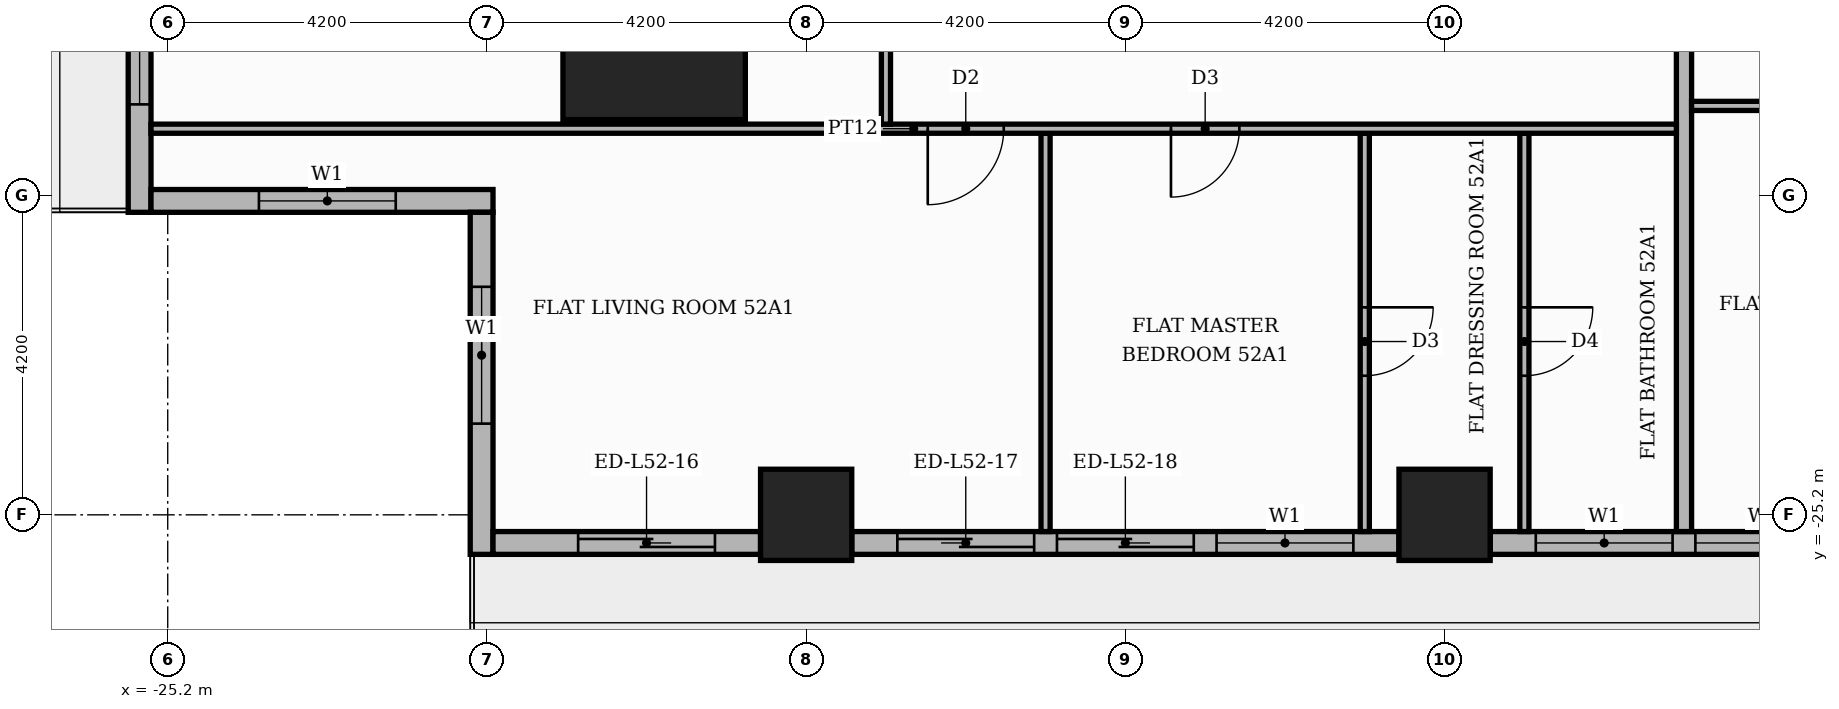
"""IFC4 building model, lengths in metres.
Left out: names, types, materials, properties, quantities, classifications, styles, units other than length and angle.
Written with IfcOpenShell. Run it as: python <this file> out.ifc"""

import sys

from ifc_helpers import new_model, si_unit, direction, frame, frame_2d, origin, origin_2d, place, context, subcontext, project, spatial, rectangle, extrude, element, fill, save


model = new_model("IFC4")
c1 = context("Model", 3, precision=1e-05, world=origin(), true_north=direction((0.0, 1.0)))
c2 = subcontext(c1, "Body", "Model", "MODEL_VIEW")
j1 = project(units=[si_unit("LENGTHUNIT", "METRE"), si_unit("PLANEANGLEUNIT", "RADIAN")], contexts=[c1])
p1 = place(None, origin())
s1 = spatial("IfcSite", under=j1, at=p1, CompositionType="ELEMENT")
p2 = place(p1, origin())
s2 = spatial("IfcBuilding", under=s1, at=p2, CompositionType="ELEMENT")
p3 = place(p2, frame((0.0, 0.0, 219.6)))
s3 = spatial("IfcBuildingStorey", under=s2, at=p3, CompositionType="ELEMENT", Elevation=219.6)
p4 = place(p3, frame((-18.8, -18.8, 0.0), z_axis=(0.0, 0.0, 1.0), x_axis=(1.0, 0.0, 0.0)))
e1 = element("IfcColumn", 1, at=p4, inside=s3, PredefinedType="COLUMN", context=c2, shape_type="SweptSolid", body=[
    extrude(rectangle(XDim=2.4, YDim=2.4, at=origin_2d()), origin(), (0.0, 0.0, 1.0), 3.9),
])
for number, where, z_axis, x_axis in (
    (2, (-8.4, -25.2, 0.0), (0.0, 0.0, 1.0), (1.0, 0.0, 0.0)),
    (3, (-16.8, -25.2, 0.0), (0.0, 0.0, 1.0), (1.0, 0.0, 0.0)),
):
    element("IfcColumn", number, at=place(p3, frame(where, z_axis=z_axis, x_axis=x_axis)), inside=s3, PredefinedType="COLUMN", context=c2, shape_type="SweptSolid", body=[
        extrude(rectangle(XDim=1.2, YDim=1.2, at=origin_2d()), origin(), (0.0, 0.0, 1.0), 3.9),
    ])
p5 = place(p3, frame((-25.57, -17.4, 0.0), z_axis=(0.0, 0.0, 1.0), x_axis=(0.0, -1.0, 0.0)))
e4 = element("IfcWall", 4, at=p5, inside=s3, PredefinedType="STANDARD", context=c2, shape_type="SweptSolid", body=[
    extrude(rectangle(XDim=3.82, YDim=0.3, at=frame_2d((1.91, 0.0))), origin(), (0.0, 0.0, 1.0), 3.48),
])
p6 = place(p5, frame((0.6, 0.0, 0.9)))
e5 = element("IfcOpeningElement", 5, at=p6, cuts=e4, PredefinedType="OPENING", context=c2, shape_type="SweptSolid", body=[
    extrude(rectangle(XDim=1.8, YDim=2.1, at=frame_2d((0.9, 1.05))), frame((0.0, 0.16, 0.0), z_axis=(0.0, -1.0, 0.0), x_axis=(1.0, 0.0, 0.0)), (0.0, 0.0, 1.0), 0.32),
])
p7 = place(p3, frame((-25.42, -21.07, 0.0), z_axis=(0.0, 0.0, 1.0), x_axis=(1.0, 0.0, 0.0)))
e6 = element("IfcWall", 6, at=p7, inside=s3, PredefinedType="STANDARD", context=c2, shape_type="SweptSolid", body=[
    extrude(rectangle(XDim=4.5, YDim=0.3, at=frame_2d((2.25, 0.0))), origin(), (0.0, 0.0, 1.0), 3.48),
])
p8 = place(p7, frame((1.42, 0.0, 0.9)))
e7 = element("IfcOpeningElement", 7, at=p8, cuts=e6, PredefinedType="OPENING", context=c2, shape_type="SweptSolid", body=[
    extrude(rectangle(XDim=1.8, YDim=2.1, at=frame_2d((0.9, 1.05))), frame((0.0, 0.16, 0.0), z_axis=(0.0, -1.0, 0.0), x_axis=(1.0, 0.0, 0.0)), (0.0, 0.0, 1.0), 0.32),
])
p9 = place(p3, frame((-21.07, -21.22, 0.0), z_axis=(0.0, 0.0, 1.0), x_axis=(0.0, -1.0, 0.0)))
e8 = element("IfcWall", 8, at=p9, inside=s3, PredefinedType="STANDARD", context=c2, shape_type="SweptSolid", body=[
    extrude(rectangle(XDim=4.5, YDim=0.3, at=frame_2d((2.25, 0.0))), origin(), (0.0, 0.0, 1.0), 3.48),
])
p10 = place(p9, frame((0.98, 0.0, 0.9)))
e9 = element("IfcOpeningElement", 9, at=p10, cuts=e8, PredefinedType="OPENING", context=c2, shape_type="SweptSolid", body=[
    extrude(rectangle(XDim=1.8, YDim=2.1, at=frame_2d((0.9, 1.05))), frame((0.0, 0.16, 0.0), z_axis=(0.0, -1.0, 0.0), x_axis=(1.0, 0.0, 0.0)), (0.0, 0.0, 1.0), 0.32),
])
p11 = place(p3, frame((-20.92, -25.57, 0.0), z_axis=(0.0, 0.0, 1.0), x_axis=(1.0, 0.0, 0.0)))
e10 = element("IfcWall", 10, at=p11, inside=s3, PredefinedType="STANDARD", context=c2, shape_type="SweptSolid", body=[
    extrude(rectangle(XDim=3.52, YDim=0.3, at=frame_2d((1.76, 0.0))), origin(), (0.0, 0.0, 1.0), 3.48),
])
p12 = place(p11, frame((1.12, 0.0, 0.0)))
e11 = element("IfcOpeningElement", 11, at=p12, cuts=e10, PredefinedType="OPENING", context=c2, shape_type="SweptSolid", body=[
    extrude(rectangle(XDim=1.8, YDim=2.4, at=frame_2d((0.9, 1.2))), frame((0.0, 0.16, 0.0), z_axis=(0.0, -1.0, 0.0), x_axis=(1.0, 0.0, 0.0)), (0.0, 0.0, 1.0), 0.32),
])
p13 = place(p3, frame((-16.2, -25.57, 0.0), z_axis=(0.0, 0.0, 1.0), x_axis=(1.0, 0.0, 0.0)))
e12 = element("IfcWall", 12, at=p13, inside=s3, PredefinedType="STANDARD", context=c2, shape_type="SweptSolid", body=[
    extrude(rectangle(XDim=7.2, YDim=0.3, at=frame_2d((3.6, 0.0))), origin(), (0.0, 0.0, 1.0), 3.48),
])
p14 = place(p13, frame((0.6, 0.0, 0.0)))
e13 = element("IfcOpeningElement", 13, at=p14, cuts=e12, PredefinedType="OPENING", context=c2, shape_type="SweptSolid", body=[
    extrude(rectangle(XDim=1.8, YDim=2.4, at=frame_2d((0.9, 1.2))), frame((0.0, 0.16, 0.0), z_axis=(0.0, -1.0, 0.0), x_axis=(1.0, 0.0, 0.0)), (0.0, 0.0, 1.0), 0.32),
])
p15 = place(p13, frame((2.7, 0.0, 0.0)))
e14 = element("IfcOpeningElement", 14, at=p15, cuts=e12, PredefinedType="OPENING", context=c2, shape_type="SweptSolid", body=[
    extrude(rectangle(XDim=1.8, YDim=2.4, at=frame_2d((0.9, 1.2))), frame((0.0, 0.16, 0.0), z_axis=(0.0, -1.0, 0.0), x_axis=(1.0, 0.0, 0.0)), (0.0, 0.0, 1.0), 0.32),
])
p16 = place(p13, frame((4.8, 0.0, 0.9)))
e15 = element("IfcOpeningElement", 15, at=p16, cuts=e12, PredefinedType="OPENING", context=c2, shape_type="SweptSolid", body=[
    extrude(rectangle(XDim=1.8, YDim=2.1, at=frame_2d((0.9, 1.05))), frame((0.0, 0.16, 0.0), z_axis=(0.0, -1.0, 0.0), x_axis=(1.0, 0.0, 0.0)), (0.0, 0.0, 1.0), 0.32),
])
p17 = place(p3, frame((-7.8, -25.57, 0.0), z_axis=(0.0, 0.0, 1.0), x_axis=(1.0, 0.0, 0.0)))
e16 = element("IfcWall", 16, at=p17, inside=s3, PredefinedType="STANDARD", context=c2, shape_type="SweptSolid", body=[
    extrude(rectangle(XDim=7.2, YDim=0.3, at=frame_2d((3.6, 0.0))), origin(), (0.0, 0.0, 1.0), 3.48),
])
p18 = place(p17, frame((0.6, 0.0, 0.9)))
e17 = element("IfcOpeningElement", 17, at=p18, cuts=e16, PredefinedType="OPENING", context=c2, shape_type="SweptSolid", body=[
    extrude(rectangle(XDim=1.8, YDim=2.1, at=frame_2d((0.9, 1.05))), frame((0.0, 0.16, 0.0), z_axis=(0.0, -1.0, 0.0), x_axis=(1.0, 0.0, 0.0)), (0.0, 0.0, 1.0), 0.32),
])
p19 = place(p17, frame((2.7, 0.0, 0.9)))
e18 = element("IfcOpeningElement", 18, at=p19, cuts=e16, PredefinedType="OPENING", context=c2, shape_type="SweptSolid", body=[
    extrude(rectangle(XDim=1.8, YDim=2.1, at=frame_2d((0.9, 1.05))), frame((0.0, 0.16, 0.0), z_axis=(0.0, -1.0, 0.0), x_axis=(1.0, 0.0, 0.0)), (0.0, 0.0, 1.0), 0.32),
])
p20 = place(p17, frame((4.8, 0.0, 0.0)))
e19 = element("IfcOpeningElement", 19, at=p20, cuts=e16, PredefinedType="OPENING", context=c2, shape_type="SweptSolid", body=[
    extrude(rectangle(XDim=1.8, YDim=2.4, at=frame_2d((0.9, 1.2))), frame((0.0, 0.16, 0.0), z_axis=(0.0, -1.0, 0.0), x_axis=(1.0, 0.0, 0.0)), (0.0, 0.0, 1.0), 0.32),
])
p21 = place(p3, frame((-13.65, -25.42, 0.0), z_axis=(0.0, 0.0, 1.0), x_axis=(0.0, 1.0, 0.0)))
e20 = element("IfcWall", 20, at=p21, inside=s3, PredefinedType="PARTITIONING", context=c2, shape_type="SweptSolid", body=[
    extrude(rectangle(XDim=5.24, YDim=0.12, at=frame_2d((2.62, 0.0))), origin(), (0.0, 0.0, 1.0), 3.48),
])
p22 = place(p3, frame((-9.45, -25.42, 0.0), z_axis=(0.0, 0.0, 1.0), x_axis=(0.0, 1.0, 0.0)))
e21 = element("IfcWall", 21, at=p22, inside=s3, PredefinedType="PARTITIONING", context=c2, shape_type="SweptSolid", body=[
    extrude(rectangle(XDim=5.24, YDim=0.12, at=frame_2d((2.62, 0.0))), origin(), (0.0, 0.0, 1.0), 3.48),
])
p23 = place(p22, frame((2.05, 0.0, 0.0)))
e22 = element("IfcOpeningElement", 22, at=p23, cuts=e21, PredefinedType="OPENING", context=c2, shape_type="SweptSolid", body=[
    extrude(rectangle(XDim=0.9, YDim=2.1, at=frame_2d((0.45, 1.05))), frame((0.0, 0.07, 0.0), z_axis=(0.0, -1.0, 0.0), x_axis=(1.0, 0.0, 0.0)), (0.0, 0.0, 1.0), 0.14),
])
p24 = place(p3, frame((-7.35, -25.42, 0.0), z_axis=(0.0, 0.0, 1.0), x_axis=(0.0, 1.0, 0.0)))
e23 = element("IfcWall", 23, at=p24, inside=s3, PredefinedType="PARTITIONING", context=c2, shape_type="SweptSolid", body=[
    extrude(rectangle(XDim=5.24, YDim=0.12, at=frame_2d((2.62, 0.0))), origin(), (0.0, 0.0, 1.0), 3.48),
])
p25 = place(p24, frame((2.05, 0.0, 0.0)))
e24 = element("IfcOpeningElement", 24, at=p25, cuts=e23, PredefinedType="OPENING", context=c2, shape_type="SweptSolid", body=[
    extrude(rectangle(XDim=0.9, YDim=2.1, at=frame_2d((0.45, 1.05))), frame((0.0, 0.07, 0.0), z_axis=(0.0, -1.0, 0.0), x_axis=(1.0, 0.0, 0.0)), (0.0, 0.0, 1.0), 0.14),
])
p26 = place(p3, frame((-5.25, -25.42, 0.0), z_axis=(0.0, 0.0, 1.0), x_axis=(0.0, 1.0, 0.0)))
e25 = element("IfcWall", 25, at=p26, inside=s3, PredefinedType="PARTITIONING", context=c2, shape_type="SweptSolid", body=[
    extrude(rectangle(XDim=11.67, YDim=0.2, at=frame_2d((5.835, 0.0))), origin(), (0.0, 0.0, 1.0), 3.48),
])
p27 = place(p3, frame((-25.42, -20.12, 0.0), z_axis=(0.0, 0.0, 1.0), x_axis=(1.0, 0.0, 0.0)))
e26 = element("IfcWall", 26, at=p27, inside=s3, PredefinedType="PARTITIONING", context=c2, shape_type="SweptSolid", body=[
    extrude(rectangle(XDim=20.07, YDim=0.12, at=frame_2d((10.035, 0.0))), origin(), (0.0, 0.0, 1.0), 3.48),
])
p28 = place(p27, frame((10.22, 0.0, 0.0)))
e27 = element("IfcOpeningElement", 27, at=p28, cuts=e26, PredefinedType="OPENING", context=c2, shape_type="SweptSolid", body=[
    extrude(rectangle(XDim=1.0, YDim=2.1, at=frame_2d((0.5, 1.05))), frame((0.0, 0.07, 0.0), z_axis=(0.0, -1.0, 0.0), x_axis=(1.0, 0.0, 0.0)), (0.0, 0.0, 1.0), 0.14),
])
p29 = place(p27, frame((13.42, 0.0, 0.0)))
e28 = element("IfcOpeningElement", 28, at=p29, cuts=e26, PredefinedType="OPENING", context=c2, shape_type="SweptSolid", body=[
    extrude(rectangle(XDim=0.9, YDim=2.1, at=frame_2d((0.45, 1.05))), frame((0.0, 0.07, 0.0), z_axis=(0.0, -1.0, 0.0), x_axis=(1.0, 0.0, 0.0)), (0.0, 0.0, 1.0), 0.14),
])
p30 = place(p3, frame((-15.75, -20.06, 0.0), z_axis=(0.0, 0.0, 1.0), x_axis=(0.0, 1.0, 0.0)))
e29 = element("IfcWall", 29, at=p30, inside=s3, PredefinedType="PARTITIONING", context=c2, shape_type="SweptSolid", body=[
    extrude(rectangle(XDim=6.31, YDim=0.12, at=frame_2d((3.155, 0.0))), origin(), (0.0, 0.0, 1.0), 3.48),
])
p31 = place(p30, frame((2.675, 0.0, 0.0)))
e30 = element("IfcOpeningElement", 30, at=p31, cuts=e29, PredefinedType="OPENING", context=c2, shape_type="SweptSolid", body=[
    extrude(rectangle(XDim=1.0, YDim=2.1, at=frame_2d((0.5, 1.05))), frame((0.0, 0.07, 0.0), z_axis=(0.0, -1.0, 0.0), x_axis=(1.0, 0.0, 0.0)), (0.0, 0.0, 1.0), 0.14),
])
p32 = place(p3, frame((-5.15, -19.82, 0.0), z_axis=(0.0, 0.0, 1.0), x_axis=(1.0, 0.0, 0.0)))
e31 = element("IfcWall", 31, at=p32, inside=s3, PredefinedType="PARTITIONING", context=c2, shape_type="SweptSolid", body=[
    extrude(rectangle(XDim=18.7, YDim=0.12, at=frame_2d((9.35, 0.0))), origin(), (0.0, 0.0, 1.0), 3.48),
])
p33 = place(p32, frame((3.65, 0.0, 0.0)))
e32 = element("IfcOpeningElement", 32, at=p33, cuts=e31, PredefinedType="OPENING", context=c2, shape_type="SweptSolid", body=[
    extrude(rectangle(XDim=0.9, YDim=2.1, at=frame_2d((0.45, 1.05))), frame((0.0, 0.07, 0.0), z_axis=(0.0, -1.0, 0.0), x_axis=(1.0, 0.0, 0.0)), (0.0, 0.0, 1.0), 0.14),
])
p34 = place(p32, frame((15.15, 0.0, 0.0)))
e33 = element("IfcOpeningElement", 33, at=p34, cuts=e31, PredefinedType="OPENING", context=c2, shape_type="SweptSolid", body=[
    extrude(rectangle(XDim=1.0, YDim=2.1, at=frame_2d((0.5, 1.05))), frame((0.0, 0.07, 0.0), z_axis=(0.0, -1.0, 0.0), x_axis=(1.0, 0.0, 0.0)), (0.0, 0.0, 1.0), 0.14),
])
p35 = place(p6, origin())
e34 = element("IfcWindow", 34, at=p35, inside=s3, PartitioningType="SINGLE_PANEL", PredefinedType="WINDOW", context=c2, shape_type="SweptSolid", body=[
    extrude(rectangle(XDim=1.8, YDim=2.1, at=frame_2d((0.9, 1.05))), frame((0.0, 0.03, 0.0), z_axis=(0.0, -1.0, 0.0), x_axis=(1.0, 0.0, 0.0)), (0.0, 0.0, 1.0), 0.06),
])
fill(e5, e34)
p36 = place(p8, origin())
e35 = element("IfcWindow", 35, at=p36, inside=s3, PartitioningType="SINGLE_PANEL", PredefinedType="WINDOW", context=c2, shape_type="SweptSolid", body=[
    extrude(rectangle(XDim=1.8, YDim=2.1, at=frame_2d((0.9, 1.05))), frame((0.0, 0.03, 0.0), z_axis=(0.0, -1.0, 0.0), x_axis=(1.0, 0.0, 0.0)), (0.0, 0.0, 1.0), 0.06),
])
fill(e7, e35)
p37 = place(p10, origin())
e36 = element("IfcWindow", 36, at=p37, inside=s3, PartitioningType="SINGLE_PANEL", PredefinedType="WINDOW", context=c2, shape_type="SweptSolid", body=[
    extrude(rectangle(XDim=1.8, YDim=2.1, at=frame_2d((0.9, 1.05))), frame((0.0, 0.03, 0.0), z_axis=(0.0, -1.0, 0.0), x_axis=(1.0, 0.0, 0.0)), (0.0, 0.0, 1.0), 0.06),
])
fill(e9, e36)
p38 = place(p12, origin())
e37 = element("IfcDoor", 37, at=p38, inside=s3, OperationType="SLIDING_TO_RIGHT", PredefinedType="DOOR", context=c2, shape_type="SweptSolid", body=[
    extrude(rectangle(XDim=1.8, YDim=2.4, at=frame_2d((0.9, 1.2))), frame((0.0, 0.025, 0.0), z_axis=(0.0, -1.0, 0.0), x_axis=(1.0, 0.0, 0.0)), (0.0, 0.0, 1.0), 0.05),
])
fill(e11, e37)
p39 = place(p14, origin())
e38 = element("IfcDoor", 38, at=p39, inside=s3, OperationType="SLIDING_TO_LEFT", PredefinedType="DOOR", context=c2, shape_type="SweptSolid", body=[
    extrude(rectangle(XDim=1.8, YDim=2.4, at=frame_2d((0.9, 1.2))), frame((0.0, 0.025, 0.0), z_axis=(0.0, -1.0, 0.0), x_axis=(1.0, 0.0, 0.0)), (0.0, 0.0, 1.0), 0.05),
])
fill(e13, e38)
p40 = place(p15, origin())
e39 = element("IfcDoor", 39, at=p40, inside=s3, OperationType="SLIDING_TO_RIGHT", PredefinedType="DOOR", context=c2, shape_type="SweptSolid", body=[
    extrude(rectangle(XDim=1.8, YDim=2.4, at=frame_2d((0.9, 1.2))), frame((0.0, 0.025, 0.0), z_axis=(0.0, -1.0, 0.0), x_axis=(1.0, 0.0, 0.0)), (0.0, 0.0, 1.0), 0.05),
])
fill(e14, e39)
p41 = place(p16, origin())
e40 = element("IfcWindow", 40, at=p41, inside=s3, PartitioningType="SINGLE_PANEL", PredefinedType="WINDOW", context=c2, shape_type="SweptSolid", body=[
    extrude(rectangle(XDim=1.8, YDim=2.1, at=frame_2d((0.9, 1.05))), frame((0.0, 0.03, 0.0), z_axis=(0.0, -1.0, 0.0), x_axis=(1.0, 0.0, 0.0)), (0.0, 0.0, 1.0), 0.06),
])
fill(e15, e40)
p42 = place(p18, origin())
e41 = element("IfcWindow", 41, at=p42, inside=s3, PartitioningType="SINGLE_PANEL", PredefinedType="WINDOW", context=c2, shape_type="SweptSolid", body=[
    extrude(rectangle(XDim=1.8, YDim=2.1, at=frame_2d((0.9, 1.05))), frame((0.0, 0.03, 0.0), z_axis=(0.0, -1.0, 0.0), x_axis=(1.0, 0.0, 0.0)), (0.0, 0.0, 1.0), 0.06),
])
fill(e17, e41)
p43 = place(p19, origin())
e42 = element("IfcWindow", 42, at=p43, inside=s3, PartitioningType="SINGLE_PANEL", PredefinedType="WINDOW", context=c2, shape_type="SweptSolid", body=[
    extrude(rectangle(XDim=1.8, YDim=2.1, at=frame_2d((0.9, 1.05))), frame((0.0, 0.03, 0.0), z_axis=(0.0, -1.0, 0.0), x_axis=(1.0, 0.0, 0.0)), (0.0, 0.0, 1.0), 0.06),
])
fill(e18, e42)
p44 = place(p28, frame((1.0, 0.0, 0.0), z_axis=(0.0, 0.0, 1.0), x_axis=(-1.0, 0.0, 0.0)))
e43 = element("IfcDoor", 43, at=p44, inside=s3, OperationType="SINGLE_SWING_LEFT", PredefinedType="DOOR", context=c2, shape_type="SweptSolid", body=[
    extrude(rectangle(XDim=1.0, YDim=2.1, at=frame_2d((0.5, 1.05))), frame((0.0, 0.025, 0.0), z_axis=(0.0, -1.0, 0.0), x_axis=(1.0, 0.0, 0.0)), (0.0, 0.0, 1.0), 0.05),
])
fill(e27, e43)
p45 = place(p29, frame((0.9, 0.0, 0.0), z_axis=(0.0, 0.0, 1.0), x_axis=(-1.0, 0.0, 0.0)))
e44 = element("IfcDoor", 44, at=p45, inside=s3, OperationType="SINGLE_SWING_LEFT", PredefinedType="DOOR", context=c2, shape_type="SweptSolid", body=[
    extrude(rectangle(XDim=0.9, YDim=2.1, at=frame_2d((0.45, 1.05))), frame((0.0, 0.025, 0.0), z_axis=(0.0, -1.0, 0.0), x_axis=(1.0, 0.0, 0.0)), (0.0, 0.0, 1.0), 0.05),
])
fill(e28, e44)
p46 = place(p23, frame((0.9, 0.0, 0.0), z_axis=(0.0, 0.0, 1.0), x_axis=(-1.0, 0.0, 0.0)))
e45 = element("IfcDoor", 45, at=p46, inside=s3, OperationType="SINGLE_SWING_RIGHT", PredefinedType="DOOR", context=c2, shape_type="SweptSolid", body=[
    extrude(rectangle(XDim=0.9, YDim=2.1, at=frame_2d((0.45, 1.05))), frame((0.0, 0.025, 0.0), z_axis=(0.0, -1.0, 0.0), x_axis=(1.0, 0.0, 0.0)), (0.0, 0.0, 1.0), 0.05),
])
fill(e22, e45)
p47 = place(p25, frame((0.9, 0.0, 0.0), z_axis=(0.0, 0.0, 1.0), x_axis=(-1.0, 0.0, 0.0)))
e46 = element("IfcDoor", 46, at=p47, inside=s3, OperationType="SINGLE_SWING_RIGHT", PredefinedType="DOOR", context=c2, shape_type="SweptSolid", body=[
    extrude(rectangle(XDim=0.9, YDim=2.1, at=frame_2d((0.45, 1.05))), frame((0.0, 0.025, 0.0), z_axis=(0.0, -1.0, 0.0), x_axis=(1.0, 0.0, 0.0)), (0.0, 0.0, 1.0), 0.05),
])
fill(e24, e46)
save(model, sys.argv[1])
